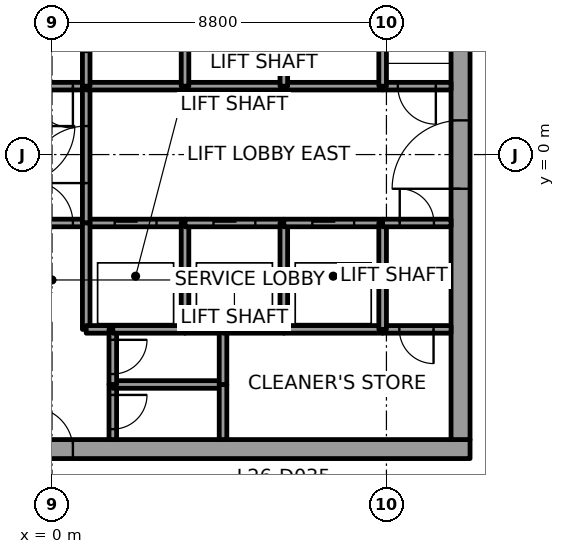
"""IFC4 building model, lengths in metres.
Left out: names, types, materials, properties, quantities, classifications, styles, units other than length and angle.
Written with IfcOpenShell. Run it as: python <this file> out.ifc"""

import sys

from ifc_helpers import new_model, si_unit, direction, frame, frame_2d, origin, place, context, subcontext, project, spatial, rectangle, extrude, element, fill, save


model = new_model("IFC4")
c1 = context("Model", 3, precision=1e-05, world=origin(), true_north=direction((0.0, 1.0)))
c2 = subcontext(c1, "Body", "Model", "MODEL_VIEW")
j1 = project(units=[si_unit("LENGTHUNIT", "METRE"), si_unit("PLANEANGLEUNIT", "RADIAN")], contexts=[c1])
p1 = place(None, origin())
s1 = spatial("IfcSite", under=j1, at=p1, CompositionType="ELEMENT")
p2 = place(p1, origin())
s2 = spatial("IfcBuilding", under=s1, at=p2, CompositionType="ELEMENT")
p3 = place(p2, frame((0.0, 0.0, 125.8)))
s3 = spatial("IfcBuildingStorey", under=s2, at=p3, CompositionType="ELEMENT", Elevation=125.8)
p4 = place(p3, frame((-11.0, -7.75, 0.0), z_axis=(0.0, 0.0, 1.0), x_axis=(1.0, 0.0, 0.0)))
e1 = element("IfcWall", 1, at=p4, inside=s3, PredefinedType="SHEAR", context=c2, shape_type="SweptSolid", body=[
    extrude(rectangle(XDim=22.0, YDim=0.5, at=frame_2d((11.0, 0.0))), origin(), (0.0, 0.0, 1.0), 4.0),
])
p5 = place(p4, frame((10.45, 0.0, 0.0)))
e2 = element("IfcOpeningElement", 2, at=p5, cuts=e1, PredefinedType="OPENING", context=c2, shape_type="SweptSolid", body=[
    extrude(rectangle(XDim=1.1, YDim=2.1, at=frame_2d((0.55, 1.05))), frame((0.0, 0.25, 0.0), z_axis=(0.0, -1.0, 0.0), x_axis=(1.0, 0.0, 0.0)), (0.0, 0.0, 1.0), 0.5),
])
p6 = place(p3, frame((10.75, -7.5, 0.0), z_axis=(0.0, 0.0, 1.0), x_axis=(0.0, 1.0, 0.0)))
e3 = element("IfcWall", 3, at=p6, inside=s3, PredefinedType="SHEAR", context=c2, shape_type="SweptSolid", body=[
    extrude(rectangle(XDim=15.0, YDim=0.5, at=frame_2d((7.5, 0.0))), origin(), (0.0, 0.0, 1.0), 4.0),
])
p7 = place(p6, frame((6.6, 0.0, 0.0)))
e4 = element("IfcOpeningElement", 4, at=p7, cuts=e3, PredefinedType="OPENING", context=c2, shape_type="SweptSolid", body=[
    extrude(rectangle(XDim=1.8, YDim=2.1, at=frame_2d((0.9, 1.05))), frame((0.0, 0.25, 0.0), z_axis=(0.0, -1.0, 0.0), x_axis=(1.0, 0.0, 0.0)), (0.0, 0.0, 1.0), 0.5),
])
p8 = place(p3, frame((-0.9, -1.8, 0.0), z_axis=(0.0, 0.0, 1.0), x_axis=(1.0, 0.0, 0.0)))
e5 = element("IfcWall", 5, at=p8, inside=s3, PredefinedType="SOLIDWALL", context=c2, shape_type="SweptSolid", body=[
    extrude(rectangle(XDim=1.8, YDim=0.2, at=frame_2d((0.9, 0.0))), origin(), (0.0, 0.0, 1.0), 3.85),
])
p9 = place(p8, frame((0.35, 0.0, 0.0)))
e6 = element("IfcOpeningElement", 6, at=p9, cuts=e5, PredefinedType="OPENING", context=c2, shape_type="SweptSolid", body=[
    extrude(rectangle(XDim=1.1, YDim=2.1, at=frame_2d((0.55, 1.05))), frame((0.0, 0.1, 0.0), z_axis=(0.0, -1.0, 0.0), x_axis=(1.0, 0.0, 0.0)), (0.0, 0.0, 1.0), 0.2),
])
p10 = place(p3, frame((0.9, 1.8, 0.0), z_axis=(0.0, 0.0, 1.0), x_axis=(-1.0, 0.0, 0.0)))
e7 = element("IfcWall", 7, at=p10, inside=s3, PredefinedType="SOLIDWALL", context=c2, shape_type="SweptSolid", body=[
    extrude(rectangle(XDim=1.8, YDim=0.2, at=frame_2d((0.9, 0.0))), origin(), (0.0, 0.0, 1.0), 3.85),
])
p11 = place(p10, frame((0.35, 0.0, 0.0)))
e8 = element("IfcOpeningElement", 8, at=p11, cuts=e7, PredefinedType="OPENING", context=c2, shape_type="SweptSolid", body=[
    extrude(rectangle(XDim=1.1, YDim=2.1, at=frame_2d((0.55, 1.05))), frame((0.0, 0.1, 0.0), z_axis=(0.0, -1.0, 0.0), x_axis=(1.0, 0.0, 0.0)), (0.0, 0.0, 1.0), 0.2),
])
p12 = place(p3, frame((0.9, -1.8, 0.0), z_axis=(0.0, 0.0, 1.0), x_axis=(1.0, 0.0, 0.0)))
e9 = element("IfcWall", 9, at=p12, inside=s3, PredefinedType="SOLIDWALL", context=c2, shape_type="SweptSolid", body=[
    extrude(rectangle(XDim=2.6, YDim=0.2, at=frame_2d((1.3, 0.0))), origin(), (0.0, 0.0, 1.0), 3.85),
])
p13 = place(p12, frame((0.75, 0.0, 0.0)))
e10 = element("IfcOpeningElement", 10, at=p13, cuts=e9, PredefinedType="OPENING", context=c2, shape_type="SweptSolid", body=[
    extrude(rectangle(XDim=1.1, YDim=2.1, at=frame_2d((0.55, 1.05))), frame((0.0, 0.1, 0.0), z_axis=(0.0, -1.0, 0.0), x_axis=(1.0, 0.0, 0.0)), (0.0, 0.0, 1.0), 0.2),
])
p14 = place(p3, frame((0.9, -1.8, 0.0), z_axis=(0.0, 0.0, 1.0), x_axis=(0.0, 1.0, 0.0)))
e11 = element("IfcWall", 11, at=p14, inside=s3, PredefinedType="SOLIDWALL", context=c2, shape_type="SweptSolid", body=[
    extrude(rectangle(XDim=3.6, YDim=0.2, at=frame_2d((1.8, 0.0))), origin(), (0.0, 0.0, 1.0), 3.85),
])
p15 = place(p14, frame((1.05, 0.0, 0.0)))
e12 = element("IfcOpeningElement", 12, at=p15, cuts=e11, PredefinedType="OPENING", context=c2, shape_type="SweptSolid", body=[
    extrude(rectangle(XDim=1.5, YDim=2.1, at=frame_2d((0.75, 1.05))), frame((0.0, 0.1, 0.0), z_axis=(0.0, -1.0, 0.0), x_axis=(1.0, 0.0, 0.0)), (0.0, 0.0, 1.0), 0.2),
])
p16 = place(p3, frame((0.9, -1.8, 0.0), z_axis=(0.0, 0.0, 1.0), x_axis=(0.0, -1.0, 0.0)))
e13 = element("IfcWall", 13, at=p16, inside=s3, PredefinedType="SOLIDWALL", context=c2, shape_type="SweptSolid", body=[
    extrude(rectangle(XDim=2.8, YDim=0.2, at=frame_2d((1.4, 0.0))), origin(), (0.0, 0.0, 1.0), 3.85),
])
p17 = place(p3, frame((0.9, -4.6, 0.0), z_axis=(0.0, 0.0, 1.0), x_axis=(1.0, 0.0, 0.0)))
e14 = element("IfcWall", 14, at=p17, inside=s3, PredefinedType="SOLIDWALL", context=c2, shape_type="SweptSolid", body=[
    extrude(rectangle(XDim=0.7, YDim=0.2, at=frame_2d((0.35, 0.0))), origin(), (0.0, 0.0, 1.0), 3.85),
])
p18 = place(p3, frame((3.5, 1.8, 0.0), z_axis=(0.0, 0.0, 1.0), x_axis=(-1.0, 0.0, 0.0)))
e15 = element("IfcWall", 15, at=p18, inside=s3, PredefinedType="SOLIDWALL", context=c2, shape_type="SweptSolid", body=[
    extrude(rectangle(XDim=2.6, YDim=0.2, at=frame_2d((1.3, 0.0))), origin(), (0.0, 0.0, 1.0), 3.85),
])
p19 = place(p3, frame((0.9, 4.8, 0.0), z_axis=(0.0, 0.0, 1.0), x_axis=(0.0, -1.0, 0.0)))
e16 = element("IfcWall", 16, at=p19, inside=s3, PredefinedType="SOLIDWALL", context=c2, shape_type="SweptSolid", body=[
    extrude(rectangle(XDim=3.0, YDim=0.2, at=frame_2d((1.5, 0.0))), origin(), (0.0, 0.0, 1.0), 3.85),
])
p20 = place(p19, frame((0.9, 0.0, 0.0)))
e17 = element("IfcOpeningElement", 17, at=p20, cuts=e16, PredefinedType="OPENING", context=c2, shape_type="SweptSolid", body=[
    extrude(rectangle(XDim=1.2, YDim=2.1, at=frame_2d((0.6, 1.05))), frame((0.0, 0.1, 0.0), z_axis=(0.0, -1.0, 0.0), x_axis=(1.0, 0.0, 0.0)), (0.0, 0.0, 1.0), 0.2),
])
p21 = place(p3, frame((1.6, -6.05, 0.0), z_axis=(0.0, 0.0, 1.0), x_axis=(0.0, -1.0, 0.0)))
e18 = element("IfcWall", 18, at=p21, inside=s3, PredefinedType="SOLIDWALL", context=c2, shape_type="SweptSolid", body=[
    extrude(rectangle(XDim=1.45, YDim=0.2, at=frame_2d((0.725, 0.0))), origin(), (0.0, 0.0, 1.0), 3.85),
])
p22 = place(p21, frame((0.275, 0.0, 0.0)))
e19 = element("IfcOpeningElement", 19, at=p22, cuts=e18, PredefinedType="OPENING", context=c2, shape_type="SweptSolid", body=[
    extrude(rectangle(XDim=0.9, YDim=2.1, at=frame_2d((0.45, 1.05))), frame((0.0, 0.1, 0.0), z_axis=(0.0, -1.0, 0.0), x_axis=(1.0, 0.0, 0.0)), (0.0, 0.0, 1.0), 0.2),
])
p23 = place(p3, frame((4.5, -6.05, 0.0), z_axis=(0.0, 0.0, 1.0), x_axis=(-1.0, 0.0, 0.0)))
e20 = element("IfcWall", 20, at=p23, inside=s3, PredefinedType="SOLIDWALL", context=c2, shape_type="SweptSolid", body=[
    extrude(rectangle(XDim=2.9, YDim=0.2, at=frame_2d((1.45, 0.0))), origin(), (0.0, 0.0, 1.0), 3.85),
])
p24 = place(p3, frame((1.6, -4.6, 0.0), z_axis=(0.0, 0.0, 1.0), x_axis=(0.0, -1.0, 0.0)))
e21 = element("IfcWall", 21, at=p24, inside=s3, PredefinedType="SOLIDWALL", context=c2, shape_type="SweptSolid", body=[
    extrude(rectangle(XDim=1.45, YDim=0.2, at=frame_2d((0.725, 0.0))), origin(), (0.0, 0.0, 1.0), 3.85),
])
p25 = place(p24, frame((0.275, 0.0, 0.0)))
e22 = element("IfcOpeningElement", 22, at=p25, cuts=e21, PredefinedType="OPENING", context=c2, shape_type="SweptSolid", body=[
    extrude(rectangle(XDim=0.9, YDim=2.1, at=frame_2d((0.45, 1.05))), frame((0.0, 0.1, 0.0), z_axis=(0.0, -1.0, 0.0), x_axis=(1.0, 0.0, 0.0)), (0.0, 0.0, 1.0), 0.2),
])
p26 = place(p3, frame((3.5, -4.6, 0.0), z_axis=(0.0, 0.0, 1.0), x_axis=(-1.0, 0.0, 0.0)))
e23 = element("IfcWall", 23, at=p26, inside=s3, PredefinedType="SOLIDWALL", context=c2, shape_type="SweptSolid", body=[
    extrude(rectangle(XDim=1.9, YDim=0.2, at=frame_2d((0.95, 0.0))), origin(), (0.0, 0.0, 1.0), 3.85),
])
p27 = place(p3, frame((4.5, -4.6, 0.0), z_axis=(0.0, 0.0, 1.0), x_axis=(-1.0, 0.0, 0.0)))
e24 = element("IfcWall", 24, at=p27, inside=s3, PredefinedType="SOLIDWALL", context=c2, shape_type="SweptSolid", body=[
    extrude(rectangle(XDim=1.0, YDim=0.2, at=frame_2d((0.5, 0.0))), origin(), (0.0, 0.0, 1.0), 3.85),
])
p28 = place(p3, frame((3.5, -4.6, 0.0), z_axis=(0.0, 0.0, 1.0), x_axis=(0.0, 1.0, 0.0)))
e25 = element("IfcWall", 25, at=p28, inside=s3, PredefinedType="SOLIDWALL", context=c2, shape_type="SweptSolid", body=[
    extrude(rectangle(XDim=2.8, YDim=0.2, at=frame_2d((1.4, 0.0))), origin(), (0.0, 0.0, 1.0), 3.85),
])
p29 = place(p3, frame((3.5, -1.8, 0.0), z_axis=(0.0, 0.0, 1.0), x_axis=(1.0, 0.0, 0.0)))
e26 = element("IfcWall", 26, at=p29, inside=s3, PredefinedType="SOLIDWALL", context=c2, shape_type="SweptSolid", body=[
    extrude(rectangle(XDim=2.6, YDim=0.2, at=frame_2d((1.3, 0.0))), origin(), (0.0, 0.0, 1.0), 3.85),
])
p30 = place(p29, frame((0.75, 0.0, 0.0)))
e27 = element("IfcOpeningElement", 27, at=p30, cuts=e26, PredefinedType="OPENING", context=c2, shape_type="SweptSolid", body=[
    extrude(rectangle(XDim=1.1, YDim=2.1, at=frame_2d((0.55, 1.05))), frame((0.0, 0.1, 0.0), z_axis=(0.0, -1.0, 0.0), x_axis=(1.0, 0.0, 0.0)), (0.0, 0.0, 1.0), 0.2),
])
p31 = place(p3, frame((6.1, 1.8, 0.0), z_axis=(0.0, 0.0, 1.0), x_axis=(-1.0, 0.0, 0.0)))
e28 = element("IfcWall", 28, at=p31, inside=s3, PredefinedType="SOLIDWALL", context=c2, shape_type="SweptSolid", body=[
    extrude(rectangle(XDim=2.6, YDim=0.2, at=frame_2d((1.3, 0.0))), origin(), (0.0, 0.0, 1.0), 3.85),
])
p32 = place(p3, frame((3.5, 1.8, 0.0), z_axis=(0.0, 0.0, 1.0), x_axis=(0.0, 1.0, 0.0)))
e29 = element("IfcWall", 29, at=p32, inside=s3, PredefinedType="SOLIDWALL", context=c2, shape_type="SweptSolid", body=[
    extrude(rectangle(XDim=2.8, YDim=0.2, at=frame_2d((1.4, 0.0))), origin(), (0.0, 0.0, 1.0), 3.85),
])
for number, where, z_axis, x_axis in (
    (30, (4.5, -6.05, 0.0), (0.0, 0.0, 1.0), (0.0, -1.0, 0.0)),
    (31, (4.5, -4.6, 0.0), (0.0, 0.0, 1.0), (0.0, -1.0, 0.0)),
):
    element("IfcWall", number, at=place(p3, frame(where, z_axis=z_axis, x_axis=x_axis)), inside=s3, PredefinedType="SOLIDWALL", context=c2, shape_type="SweptSolid", body=[
        extrude(rectangle(XDim=1.45, YDim=0.2, at=frame_2d((0.725, 0.0))), origin(), (0.0, 0.0, 1.0), 3.85),
    ])
p33 = place(p3, frame((6.1, -4.6, 0.0), z_axis=(0.0, 0.0, 1.0), x_axis=(-1.0, 0.0, 0.0)))
e32 = element("IfcWall", 32, at=p33, inside=s3, PredefinedType="SOLIDWALL", context=c2, shape_type="SweptSolid", body=[
    extrude(rectangle(XDim=1.6, YDim=0.2, at=frame_2d((0.8, 0.0))), origin(), (0.0, 0.0, 1.0), 3.85),
])
p34 = place(p3, frame((8.7, -4.6, 0.0), z_axis=(0.0, 0.0, 1.0), x_axis=(-1.0, 0.0, 0.0)))
e33 = element("IfcWall", 33, at=p34, inside=s3, PredefinedType="SOLIDWALL", context=c2, shape_type="SweptSolid", body=[
    extrude(rectangle(XDim=2.6, YDim=0.2, at=frame_2d((1.3, 0.0))), origin(), (0.0, 0.0, 1.0), 3.85),
])
p35 = place(p3, frame((6.1, -4.6, 0.0), z_axis=(0.0, 0.0, 1.0), x_axis=(0.0, 1.0, 0.0)))
e34 = element("IfcWall", 34, at=p35, inside=s3, PredefinedType="SOLIDWALL", context=c2, shape_type="SweptSolid", body=[
    extrude(rectangle(XDim=2.8, YDim=0.2, at=frame_2d((1.4, 0.0))), origin(), (0.0, 0.0, 1.0), 3.85),
])
p36 = place(p3, frame((6.1, -1.8, 0.0), z_axis=(0.0, 0.0, 1.0), x_axis=(1.0, 0.0, 0.0)))
e35 = element("IfcWall", 35, at=p36, inside=s3, PredefinedType="SOLIDWALL", context=c2, shape_type="SweptSolid", body=[
    extrude(rectangle(XDim=2.6, YDim=0.2, at=frame_2d((1.3, 0.0))), origin(), (0.0, 0.0, 1.0), 3.85),
])
p37 = place(p36, frame((0.75, 0.0, 0.0)))
e36 = element("IfcOpeningElement", 36, at=p37, cuts=e35, PredefinedType="OPENING", context=c2, shape_type="SweptSolid", body=[
    extrude(rectangle(XDim=1.1, YDim=2.1, at=frame_2d((0.55, 1.05))), frame((0.0, 0.1, 0.0), z_axis=(0.0, -1.0, 0.0), x_axis=(1.0, 0.0, 0.0)), (0.0, 0.0, 1.0), 0.2),
])
p38 = place(p3, frame((8.7, 1.8, 0.0), z_axis=(0.0, 0.0, 1.0), x_axis=(-1.0, 0.0, 0.0)))
e37 = element("IfcWall", 37, at=p38, inside=s3, PredefinedType="SOLIDWALL", context=c2, shape_type="SweptSolid", body=[
    extrude(rectangle(XDim=2.6, YDim=0.2, at=frame_2d((1.3, 0.0))), origin(), (0.0, 0.0, 1.0), 3.85),
])
p39 = place(p3, frame((6.1, 1.8, 0.0), z_axis=(0.0, 0.0, 1.0), x_axis=(0.0, 1.0, 0.0)))
e38 = element("IfcWall", 38, at=p39, inside=s3, PredefinedType="SOLIDWALL", context=c2, shape_type="SweptSolid", body=[
    extrude(rectangle(XDim=2.8, YDim=0.2, at=frame_2d((1.4, 0.0))), origin(), (0.0, 0.0, 1.0), 3.85),
])
p40 = place(p3, frame((10.5, -4.6, 0.0), z_axis=(0.0, 0.0, 1.0), x_axis=(-1.0, 0.0, 0.0)))
e39 = element("IfcWall", 39, at=p40, inside=s3, PredefinedType="SOLIDWALL", context=c2, shape_type="SweptSolid", body=[
    extrude(rectangle(XDim=1.8, YDim=0.2, at=frame_2d((0.9, 0.0))), origin(), (0.0, 0.0, 1.0), 3.85),
])
p41 = place(p40, frame((0.46, 0.0, 0.0)))
e40 = element("IfcOpeningElement", 40, at=p41, cuts=e39, PredefinedType="OPENING", context=c2, shape_type="SweptSolid", body=[
    extrude(rectangle(XDim=0.9, YDim=2.1, at=frame_2d((0.45, 1.05))), frame((0.0, 0.1, 0.0), z_axis=(0.0, -1.0, 0.0), x_axis=(1.0, 0.0, 0.0)), (0.0, 0.0, 1.0), 0.2),
])
p42 = place(p3, frame((8.7, -1.8, 0.0), z_axis=(0.0, 0.0, 1.0), x_axis=(0.0, -1.0, 0.0)))
e41 = element("IfcWall", 41, at=p42, inside=s3, PredefinedType="SOLIDWALL", context=c2, shape_type="SweptSolid", body=[
    extrude(rectangle(XDim=2.8, YDim=0.2, at=frame_2d((1.4, 0.0))), origin(), (0.0, 0.0, 1.0), 3.85),
])
p43 = place(p3, frame((8.7, -1.8, 0.0), z_axis=(0.0, 0.0, 1.0), x_axis=(1.0, 0.0, 0.0)))
e42 = element("IfcWall", 42, at=p43, inside=s3, PredefinedType="SOLIDWALL", context=c2, shape_type="SweptSolid", body=[
    extrude(rectangle(XDim=1.8, YDim=0.2, at=frame_2d((0.9, 0.0))), origin(), (0.0, 0.0, 1.0), 3.85),
])
p44 = place(p43, frame((0.45, 0.0, 0.0)))
e43 = element("IfcOpeningElement", 43, at=p44, cuts=e42, PredefinedType="OPENING", context=c2, shape_type="SweptSolid", body=[
    extrude(rectangle(XDim=0.9, YDim=2.1, at=frame_2d((0.45, 1.05))), frame((0.0, 0.1, 0.0), z_axis=(0.0, -1.0, 0.0), x_axis=(1.0, 0.0, 0.0)), (0.0, 0.0, 1.0), 0.2),
])
p45 = place(p3, frame((10.5, 1.8, 0.0), z_axis=(0.0, 0.0, 1.0), x_axis=(-1.0, 0.0, 0.0)))
e44 = element("IfcWall", 44, at=p45, inside=s3, PredefinedType="SOLIDWALL", context=c2, shape_type="SweptSolid", body=[
    extrude(rectangle(XDim=1.8, YDim=0.2, at=frame_2d((0.9, 0.0))), origin(), (0.0, 0.0, 1.0), 3.85),
])
p46 = place(p45, frame((0.4, 0.0, 0.0)))
e45 = element("IfcOpeningElement", 45, at=p46, cuts=e44, PredefinedType="OPENING", context=c2, shape_type="SweptSolid", body=[
    extrude(rectangle(XDim=1.0, YDim=2.1, at=frame_2d((0.5, 1.05))), frame((0.0, 0.1, 0.0), z_axis=(0.0, -1.0, 0.0), x_axis=(1.0, 0.0, 0.0)), (0.0, 0.0, 1.0), 0.2),
])
p47 = place(p3, frame((8.7, 4.6, 0.0), z_axis=(0.0, 0.0, 1.0), x_axis=(0.0, -1.0, 0.0)))
e46 = element("IfcWall", 46, at=p47, inside=s3, PredefinedType="SOLIDWALL", context=c2, shape_type="SweptSolid", body=[
    extrude(rectangle(XDim=2.8, YDim=0.2, at=frame_2d((1.4, 0.0))), origin(), (0.0, 0.0, 1.0), 3.85),
])
p48 = place(p13, origin())
e47 = element("IfcDoor", 47, at=p48, inside=s3, OperationType="SLIDING_TO_RIGHT", PredefinedType="DOOR", context=c2, shape_type="SweptSolid", body=[
    extrude(rectangle(XDim=1.1, YDim=2.1, at=frame_2d((0.55, 1.05))), frame((0.0, 0.025, 0.0), z_axis=(0.0, -1.0, 0.0), x_axis=(1.0, 0.0, 0.0)), (0.0, 0.0, 1.0), 0.05),
])
fill(e10, e47)
p49 = place(p30, origin())
e48 = element("IfcDoor", 48, at=p49, inside=s3, OperationType="SLIDING_TO_LEFT", PredefinedType="DOOR", context=c2, shape_type="SweptSolid", body=[
    extrude(rectangle(XDim=1.1, YDim=2.1, at=frame_2d((0.55, 1.05))), frame((0.0, 0.025, 0.0), z_axis=(0.0, -1.0, 0.0), x_axis=(1.0, 0.0, 0.0)), (0.0, 0.0, 1.0), 0.05),
])
fill(e27, e48)
p50 = place(p37, origin())
e49 = element("IfcDoor", 49, at=p50, inside=s3, OperationType="SLIDING_TO_RIGHT", PredefinedType="DOOR", context=c2, shape_type="SweptSolid", body=[
    extrude(rectangle(XDim=1.1, YDim=2.1, at=frame_2d((0.55, 1.05))), frame((0.0, 0.025, 0.0), z_axis=(0.0, -1.0, 0.0), x_axis=(1.0, 0.0, 0.0)), (0.0, 0.0, 1.0), 0.05),
])
fill(e36, e49)
p51 = place(p15, origin())
e50 = element("IfcDoor", 50, at=p51, inside=s3, OperationType="DOUBLE_DOOR_SINGLE_SWING", PredefinedType="DOOR", context=c2, shape_type="SweptSolid", body=[
    extrude(rectangle(XDim=1.5, YDim=2.1, at=frame_2d((0.75, 1.05))), frame((0.0, 0.025, 0.0), z_axis=(0.0, -1.0, 0.0), x_axis=(1.0, 0.0, 0.0)), (0.0, 0.0, 1.0), 0.05),
])
fill(e12, e50)
p52 = place(p11, origin())
e51 = element("IfcDoor", 51, at=p52, inside=s3, OperationType="SINGLE_SWING_LEFT", PredefinedType="DOOR", context=c2, shape_type="SweptSolid", body=[
    extrude(rectangle(XDim=1.1, YDim=2.1, at=frame_2d((0.55, 1.05))), frame((0.0, 0.025, 0.0), z_axis=(0.0, -1.0, 0.0), x_axis=(1.0, 0.0, 0.0)), (0.0, 0.0, 1.0), 0.05),
])
fill(e8, e51)
p53 = place(p9, origin())
e52 = element("IfcDoor", 52, at=p53, inside=s3, OperationType="SINGLE_SWING_LEFT", PredefinedType="DOOR", context=c2, shape_type="SweptSolid", body=[
    extrude(rectangle(XDim=1.1, YDim=2.1, at=frame_2d((0.55, 1.05))), frame((0.0, 0.025, 0.0), z_axis=(0.0, -1.0, 0.0), x_axis=(1.0, 0.0, 0.0)), (0.0, 0.0, 1.0), 0.05),
])
fill(e6, e52)
p54 = place(p46, origin())
e53 = element("IfcDoor", 53, at=p54, inside=s3, OperationType="SINGLE_SWING_RIGHT", PredefinedType="DOOR", context=c2, shape_type="SweptSolid", body=[
    extrude(rectangle(XDim=1.0, YDim=2.1, at=frame_2d((0.5, 1.05))), frame((0.0, 0.025, 0.0), z_axis=(0.0, -1.0, 0.0), x_axis=(1.0, 0.0, 0.0)), (0.0, 0.0, 1.0), 0.05),
])
fill(e45, e53)
p55 = place(p41, origin())
e54 = element("IfcDoor", 54, at=p55, inside=s3, OperationType="SINGLE_SWING_RIGHT", PredefinedType="DOOR", context=c2, shape_type="SweptSolid", body=[
    extrude(rectangle(XDim=0.9, YDim=2.1, at=frame_2d((0.45, 1.05))), frame((0.0, 0.025, 0.0), z_axis=(0.0, -1.0, 0.0), x_axis=(1.0, 0.0, 0.0)), (0.0, 0.0, 1.0), 0.05),
])
fill(e40, e54)
p56 = place(p44, origin())
e55 = element("IfcDoor", 55, at=p56, inside=s3, OperationType="SINGLE_SWING_LEFT", PredefinedType="DOOR", context=c2, shape_type="SweptSolid", body=[
    extrude(rectangle(XDim=0.9, YDim=2.1, at=frame_2d((0.45, 1.05))), frame((0.0, 0.025, 0.0), z_axis=(0.0, -1.0, 0.0), x_axis=(1.0, 0.0, 0.0)), (0.0, 0.0, 1.0), 0.05),
])
fill(e43, e55)
p57 = place(p22, origin())
e56 = element("IfcDoor", 56, at=p57, inside=s3, OperationType="SINGLE_SWING_RIGHT", PredefinedType="DOOR", context=c2, shape_type="SweptSolid", body=[
    extrude(rectangle(XDim=0.9, YDim=2.1, at=frame_2d((0.45, 1.05))), frame((0.0, 0.025, 0.0), z_axis=(0.0, -1.0, 0.0), x_axis=(1.0, 0.0, 0.0)), (0.0, 0.0, 1.0), 0.05),
])
fill(e19, e56)
p58 = place(p25, origin())
e57 = element("IfcDoor", 57, at=p58, inside=s3, OperationType="SINGLE_SWING_RIGHT", PredefinedType="DOOR", context=c2, shape_type="SweptSolid", body=[
    extrude(rectangle(XDim=0.9, YDim=2.1, at=frame_2d((0.45, 1.05))), frame((0.0, 0.025, 0.0), z_axis=(0.0, -1.0, 0.0), x_axis=(1.0, 0.0, 0.0)), (0.0, 0.0, 1.0), 0.05),
])
fill(e22, e57)
p59 = place(p7, origin())
e58 = element("IfcDoor", 58, at=p59, inside=s3, OperationType="DOUBLE_DOOR_SINGLE_SWING", PredefinedType="DOOR", context=c2, shape_type="SweptSolid", body=[
    extrude(rectangle(XDim=1.8, YDim=2.1, at=frame_2d((0.9, 1.05))), frame((0.0, 0.025, 0.0), z_axis=(0.0, -1.0, 0.0), x_axis=(1.0, 0.0, 0.0)), (0.0, 0.0, 1.0), 0.05),
])
fill(e4, e58)
p60 = place(p5, origin())
e59 = element("IfcDoor", 59, at=p60, inside=s3, OperationType="SINGLE_SWING_RIGHT", PredefinedType="DOOR", context=c2, shape_type="SweptSolid", body=[
    extrude(rectangle(XDim=1.1, YDim=2.1, at=frame_2d((0.55, 1.05))), frame((0.0, 0.025, 0.0), z_axis=(0.0, -1.0, 0.0), x_axis=(1.0, 0.0, 0.0)), (0.0, 0.0, 1.0), 0.05),
])
fill(e2, e59)
save(model, sys.argv[1])
